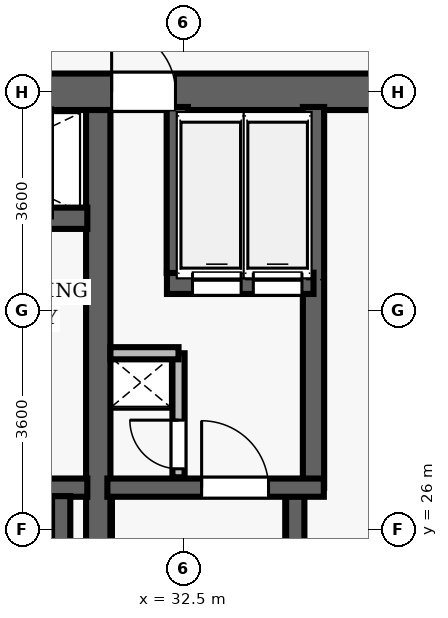
"""IFC4 building model, lengths in metres.
Left out: names, types, materials, properties, quantities, classifications, styles, units other than length and angle.
Written with IfcOpenShell. Run it as: python <this file> out.ifc"""

import sys

from ifc_helpers import new_model, si_unit, direction, frame, frame_2d, origin, place, context, subcontext, project, spatial, rectangle, extrude, element, fill, save


model = new_model("IFC4")
c1 = context("Model", 3, precision=1e-05, world=origin(), true_north=direction((0.0, 1.0)))
c2 = subcontext(c1, "Body", "Model", "MODEL_VIEW")
j1 = project(units=[si_unit("LENGTHUNIT", "METRE"), si_unit("PLANEANGLEUNIT", "RADIAN")], contexts=[c1])
p1 = place(None, origin())
s1 = spatial("IfcSite", under=j1, at=p1, CompositionType="ELEMENT")
p2 = place(p1, origin())
s2 = spatial("IfcBuilding", under=s1, at=p2, CompositionType="ELEMENT")
p3 = place(p2, frame((0.0, 0.0, 162.3)))
s3 = spatial("IfcBuildingStorey", under=s2, at=p3, CompositionType="ELEMENT", Elevation=162.3)
p4 = place(p3, frame((26.7, 33.2, 0.0), z_axis=(0.0, 0.0, 1.0), x_axis=(1.0, 0.0, 0.0)))
e1 = element("IfcWall", 1, at=p4, inside=s3, PredefinedType="SHEAR", context=c2, shape_type="SweptSolid", body=[
    extrude(rectangle(XDim=22.6, YDim=0.6, at=frame_2d((11.3, 0.0))), origin(), (0.0, 0.0, 1.0), 3.5),
])
p5 = place(p4, frame((4.62, 0.0, 0.0)))
e2 = element("IfcOpeningElement", 2, at=p5, cuts=e1, PredefinedType="OPENING", context=c2, shape_type="SweptSolid", body=[
    extrude(rectangle(XDim=1.05, YDim=2.15, at=frame_2d((0.525, 1.075))), frame((0.0, 0.31, 0.0), z_axis=(0.0, -1.0, 0.0), x_axis=(1.0, 0.0, 0.0)), (0.0, 0.0, 1.0), 0.62),
])
p6 = place(p4, frame((14.52, 0.0, 0.0)))
e3 = element("IfcOpeningElement", 3, at=p6, cuts=e1, PredefinedType="OPENING", context=c2, shape_type="SweptSolid", body=[
    extrude(rectangle(XDim=1.05, YDim=2.15, at=frame_2d((0.525, 1.075))), frame((0.0, 0.31, 0.0), z_axis=(0.0, -1.0, 0.0), x_axis=(1.0, 0.0, 0.0)), (0.0, 0.0, 1.0), 0.62),
])
p7 = place(p3, frame((31.1, 19.1, 0.0), z_axis=(0.0, 0.0, 1.0), x_axis=(0.0, 1.0, 0.0)))
e4 = element("IfcWall", 4, at=p7, inside=s3, PredefinedType="SHEAR", context=c2, shape_type="SweptSolid", body=[
    extrude(rectangle(XDim=13.8, YDim=0.4, at=frame_2d((6.9, 0.0))), origin(), (0.0, 0.0, 1.0), 3.5),
])
p8 = place(p3, frame((27.25, 26.69, 0.0), z_axis=(0.0, 0.0, 1.0), x_axis=(1.0, 0.0, 0.0)))
e5 = element("IfcWall", 5, at=p8, inside=s3, PredefinedType="SHEAR", context=c2, shape_type="SweptSolid", body=[
    extrude(rectangle(XDim=3.67, YDim=0.3, at=frame_2d((1.835, 0.0))), origin(), (0.0, 0.0, 1.0), 3.5),
])
p9 = place(p8, frame((1.05, 0.0, 0.0)))
e6 = element("IfcOpeningElement", 6, at=p9, cuts=e5, PredefinedType="OPENING", context=c2, shape_type="SweptSolid", body=[
    extrude(rectangle(XDim=1.1, YDim=2.15, at=frame_2d((0.55, 1.075))), frame((0.0, 0.16, 0.0), z_axis=(0.0, -1.0, 0.0), x_axis=(1.0, 0.0, 0.0)), (0.0, 0.0, 1.0), 0.32),
])
p10 = place(p3, frame((30.49, 19.05, 0.0), z_axis=(0.0, 0.0, 1.0), x_axis=(0.0, 1.0, 0.0)))
e7 = element("IfcWall", 7, at=p10, inside=s3, PredefinedType="SHEAR", context=c2, shape_type="SweptSolid", body=[
    extrude(rectangle(XDim=7.5, YDim=0.3, at=frame_2d((3.75, 0.0))), origin(), (0.0, 0.0, 1.0), 3.5),
])
p11 = place(p3, frame((27.25, 31.12, 0.0), z_axis=(0.0, 0.0, 1.0), x_axis=(1.0, 0.0, 0.0)))
e8 = element("IfcWall", 8, at=p11, inside=s3, PredefinedType="SHEAR", context=c2, shape_type="SweptSolid", body=[
    extrude(rectangle(XDim=3.67, YDim=0.35, at=frame_2d((1.835, 0.0))), origin(), (0.0, 0.0, 1.0), 2.565),
])
p12 = place(p11, frame((1.25, 0.0, 0.0)))
e9 = element("IfcOpeningElement", 9, at=p12, cuts=e8, PredefinedType="OPENING", context=c2, shape_type="SweptSolid", body=[
    extrude(rectangle(XDim=1.1, YDim=2.15, at=frame_2d((0.55, 1.075))), frame((0.0, 0.185, 0.0), z_axis=(0.0, -1.0, 0.0), x_axis=(1.0, 0.0, 0.0)), (0.0, 0.0, 1.0), 0.37),
])
p13 = place(p3, frame((34.34, 19.05, 0.0), z_axis=(0.0, 0.0, 1.0), x_axis=(0.0, 1.0, 0.0)))
e10 = element("IfcWall", 10, at=p13, inside=s3, PredefinedType="SHEAR", context=c2, shape_type="SweptSolid", body=[
    extrude(rectangle(XDim=7.5, YDim=0.3, at=frame_2d((3.75, 0.0))), origin(), (0.0, 0.0, 1.0), 3.5),
])
p14 = place(p3, frame((34.64, 26.69, 0.0), z_axis=(0.0, 0.0, 1.0), x_axis=(0.0, 1.0, 0.0)))
e11 = element("IfcWall", 11, at=p14, inside=s3, PredefinedType="SHEAR", context=c2, shape_type="SweptSolid", body=[
    extrude(rectangle(XDim=6.26, YDim=0.35, at=frame_2d((3.13, 0.0))), origin(), (0.0, 0.0, 1.0), 3.5),
])
p15 = place(p3, frame((31.25, 26.69, 0.0), z_axis=(0.0, 0.0, 1.0), x_axis=(1.0, 0.0, 0.0)))
e12 = element("IfcWall", 12, at=p15, inside=s3, PredefinedType="SHEAR", context=c2, shape_type="SweptSolid", body=[
    extrude(rectangle(XDim=3.56, YDim=0.3, at=frame_2d((1.78, 0.0))), origin(), (0.0, 0.0, 1.0), 3.5),
])
p16 = place(p15, frame((1.55, 0.0, 0.0)))
e13 = element("IfcOpeningElement", 13, at=p16, cuts=e12, PredefinedType="OPENING", context=c2, shape_type="SweptSolid", body=[
    extrude(rectangle(XDim=1.1, YDim=2.15, at=frame_2d((0.55, 1.075))), frame((0.0, 0.16, 0.0), z_axis=(0.0, -1.0, 0.0), x_axis=(1.0, 0.0, 0.0)), (0.0, 0.0, 1.0), 0.32),
])
p17 = place(p3, frame((32.23, 30.05, 0.0), z_axis=(0.0, 0.0, 1.0), x_axis=(1.0, 0.0, 0.0)))
e14 = element("IfcWall", 14, at=p17, inside=s3, PredefinedType="SHEAR", context=c2, shape_type="SweptSolid", body=[
    extrude(rectangle(XDim=2.41, YDim=0.35, at=frame_2d((1.205, 0.0))), origin(), (0.0, 0.0, 1.0), 2.565),
])
p18 = place(p17, frame((0.42, 0.0, 0.0)))
e15 = element("IfcOpeningElement", 15, at=p18, cuts=e14, PredefinedType="OPENING", context=c2, shape_type="SweptSolid", body=[
    extrude(rectangle(XDim=0.8, YDim=2.15, at=frame_2d((0.4, 1.075))), frame((0.0, 0.185, 0.0), z_axis=(0.0, -1.0, 0.0), x_axis=(1.0, 0.0, 0.0)), (0.0, 0.0, 1.0), 0.37),
])
p19 = place(p17, frame((1.42, 0.0, 0.0)))
e16 = element("IfcOpeningElement", 16, at=p19, cuts=e14, PredefinedType="OPENING", context=c2, shape_type="SweptSolid", body=[
    extrude(rectangle(XDim=0.8, YDim=2.15, at=frame_2d((0.4, 1.075))), frame((0.0, 0.185, 0.0), z_axis=(0.0, -1.0, 0.0), x_axis=(1.0, 0.0, 0.0)), (0.0, 0.0, 1.0), 0.37),
])
p20 = place(p3, frame((32.4, 30.22, 0.0), z_axis=(0.0, 0.0, 1.0), x_axis=(0.0, 1.0, 0.0)))
e17 = element("IfcWall", 17, at=p20, inside=s3, PredefinedType="SHEAR", context=c2, shape_type="SweptSolid", body=[
    extrude(rectangle(XDim=2.73, YDim=0.35, at=frame_2d((1.365, 0.0))), origin(), (0.0, 0.0, 1.0), 2.565),
])
p21 = place(p3, frame((32.42, 26.86, 0.0), z_axis=(0.0, 0.0, 1.0), x_axis=(0.0, 1.0, 0.0)))
e18 = element("IfcWall", 18, at=p21, inside=s3, PredefinedType="PARTITIONING", context=c2, shape_type="SweptSolid", body=[
    extrude(rectangle(XDim=2.04, YDim=0.2, at=frame_2d((1.02, 0.0))), origin(), (0.0, 0.0, 1.0), 2.565),
])
p22 = place(p21, frame((0.14, 0.0, 0.0)))
e19 = element("IfcOpeningElement", 19, at=p22, cuts=e18, PredefinedType="OPENING", context=c2, shape_type="SweptSolid", body=[
    extrude(rectangle(XDim=0.8, YDim=2.05, at=frame_2d((0.4, 1.025))), frame((0.0, 0.11, 0.0), z_axis=(0.0, -1.0, 0.0), x_axis=(1.0, 0.0, 0.0)), (0.0, 0.0, 1.0), 0.22),
])
p23 = place(p3, frame((31.3, 28.9, 0.0), z_axis=(0.0, 0.0, 1.0), x_axis=(1.0, 0.0, 0.0)))
e20 = element("IfcWall", 20, at=p23, inside=s3, PredefinedType="PARTITIONING", context=c2, shape_type="SweptSolid", body=[
    extrude(rectangle(XDim=1.12, YDim=0.2, at=frame_2d((0.56, 0.0))), origin(), (0.0, 0.0, 1.0), 2.565),
])
p24 = place(p16, origin())
e21 = element("IfcDoor", 21, at=p24, inside=s3, OperationType="SINGLE_SWING_LEFT", PredefinedType="DOOR", context=c2, shape_type="SweptSolid", body=[
    extrude(rectangle(XDim=1.1, YDim=2.15, at=frame_2d((0.55, 1.075))), frame((0.0, 0.025, 0.0), z_axis=(0.0, -1.0, 0.0), x_axis=(1.0, 0.0, 0.0)), (0.0, 0.0, 1.0), 0.05),
])
fill(e13, e21)
p25 = place(p22, origin())
e22 = element("IfcDoor", 22, at=p25, inside=s3, OperationType="SINGLE_SWING_RIGHT", PredefinedType="DOOR", context=c2, shape_type="SweptSolid", body=[
    extrude(rectangle(XDim=0.8, YDim=2.05, at=frame_2d((0.4, 1.025))), frame((0.0, 0.025, 0.0), z_axis=(0.0, -1.0, 0.0), x_axis=(1.0, 0.0, 0.0)), (0.0, 0.0, 1.0), 0.05),
])
fill(e19, e22)
p26 = place(p5, origin())
e23 = element("IfcDoor", 23, at=p26, inside=s3, OperationType="SINGLE_SWING_LEFT", PredefinedType="DOOR", context=c2, shape_type="SweptSolid", body=[
    extrude(rectangle(XDim=1.05, YDim=2.15, at=frame_2d((0.525, 1.075))), frame((0.0, 0.025, 0.0), z_axis=(0.0, -1.0, 0.0), x_axis=(1.0, 0.0, 0.0)), (0.0, 0.0, 1.0), 0.05),
])
fill(e2, e23)
p27 = place(p18, origin())
e24 = element("IfcDoor", 24, at=p27, inside=s3, OperationType="SLIDING_TO_LEFT", PredefinedType="DOOR", context=c2, shape_type="SweptSolid", body=[
    extrude(rectangle(XDim=0.8, YDim=2.15, at=frame_2d((0.4, 1.075))), frame((0.0, 0.025, 0.0), z_axis=(0.0, -1.0, 0.0), x_axis=(1.0, 0.0, 0.0)), (0.0, 0.0, 1.0), 0.05),
])
fill(e15, e24)
p28 = place(p19, origin())
e25 = element("IfcDoor", 25, at=p28, inside=s3, OperationType="SLIDING_TO_LEFT", PredefinedType="DOOR", context=c2, shape_type="SweptSolid", body=[
    extrude(rectangle(XDim=0.8, YDim=2.15, at=frame_2d((0.4, 1.075))), frame((0.0, 0.025, 0.0), z_axis=(0.0, -1.0, 0.0), x_axis=(1.0, 0.0, 0.0)), (0.0, 0.0, 1.0), 0.05),
])
fill(e16, e25)
save(model, sys.argv[1])
